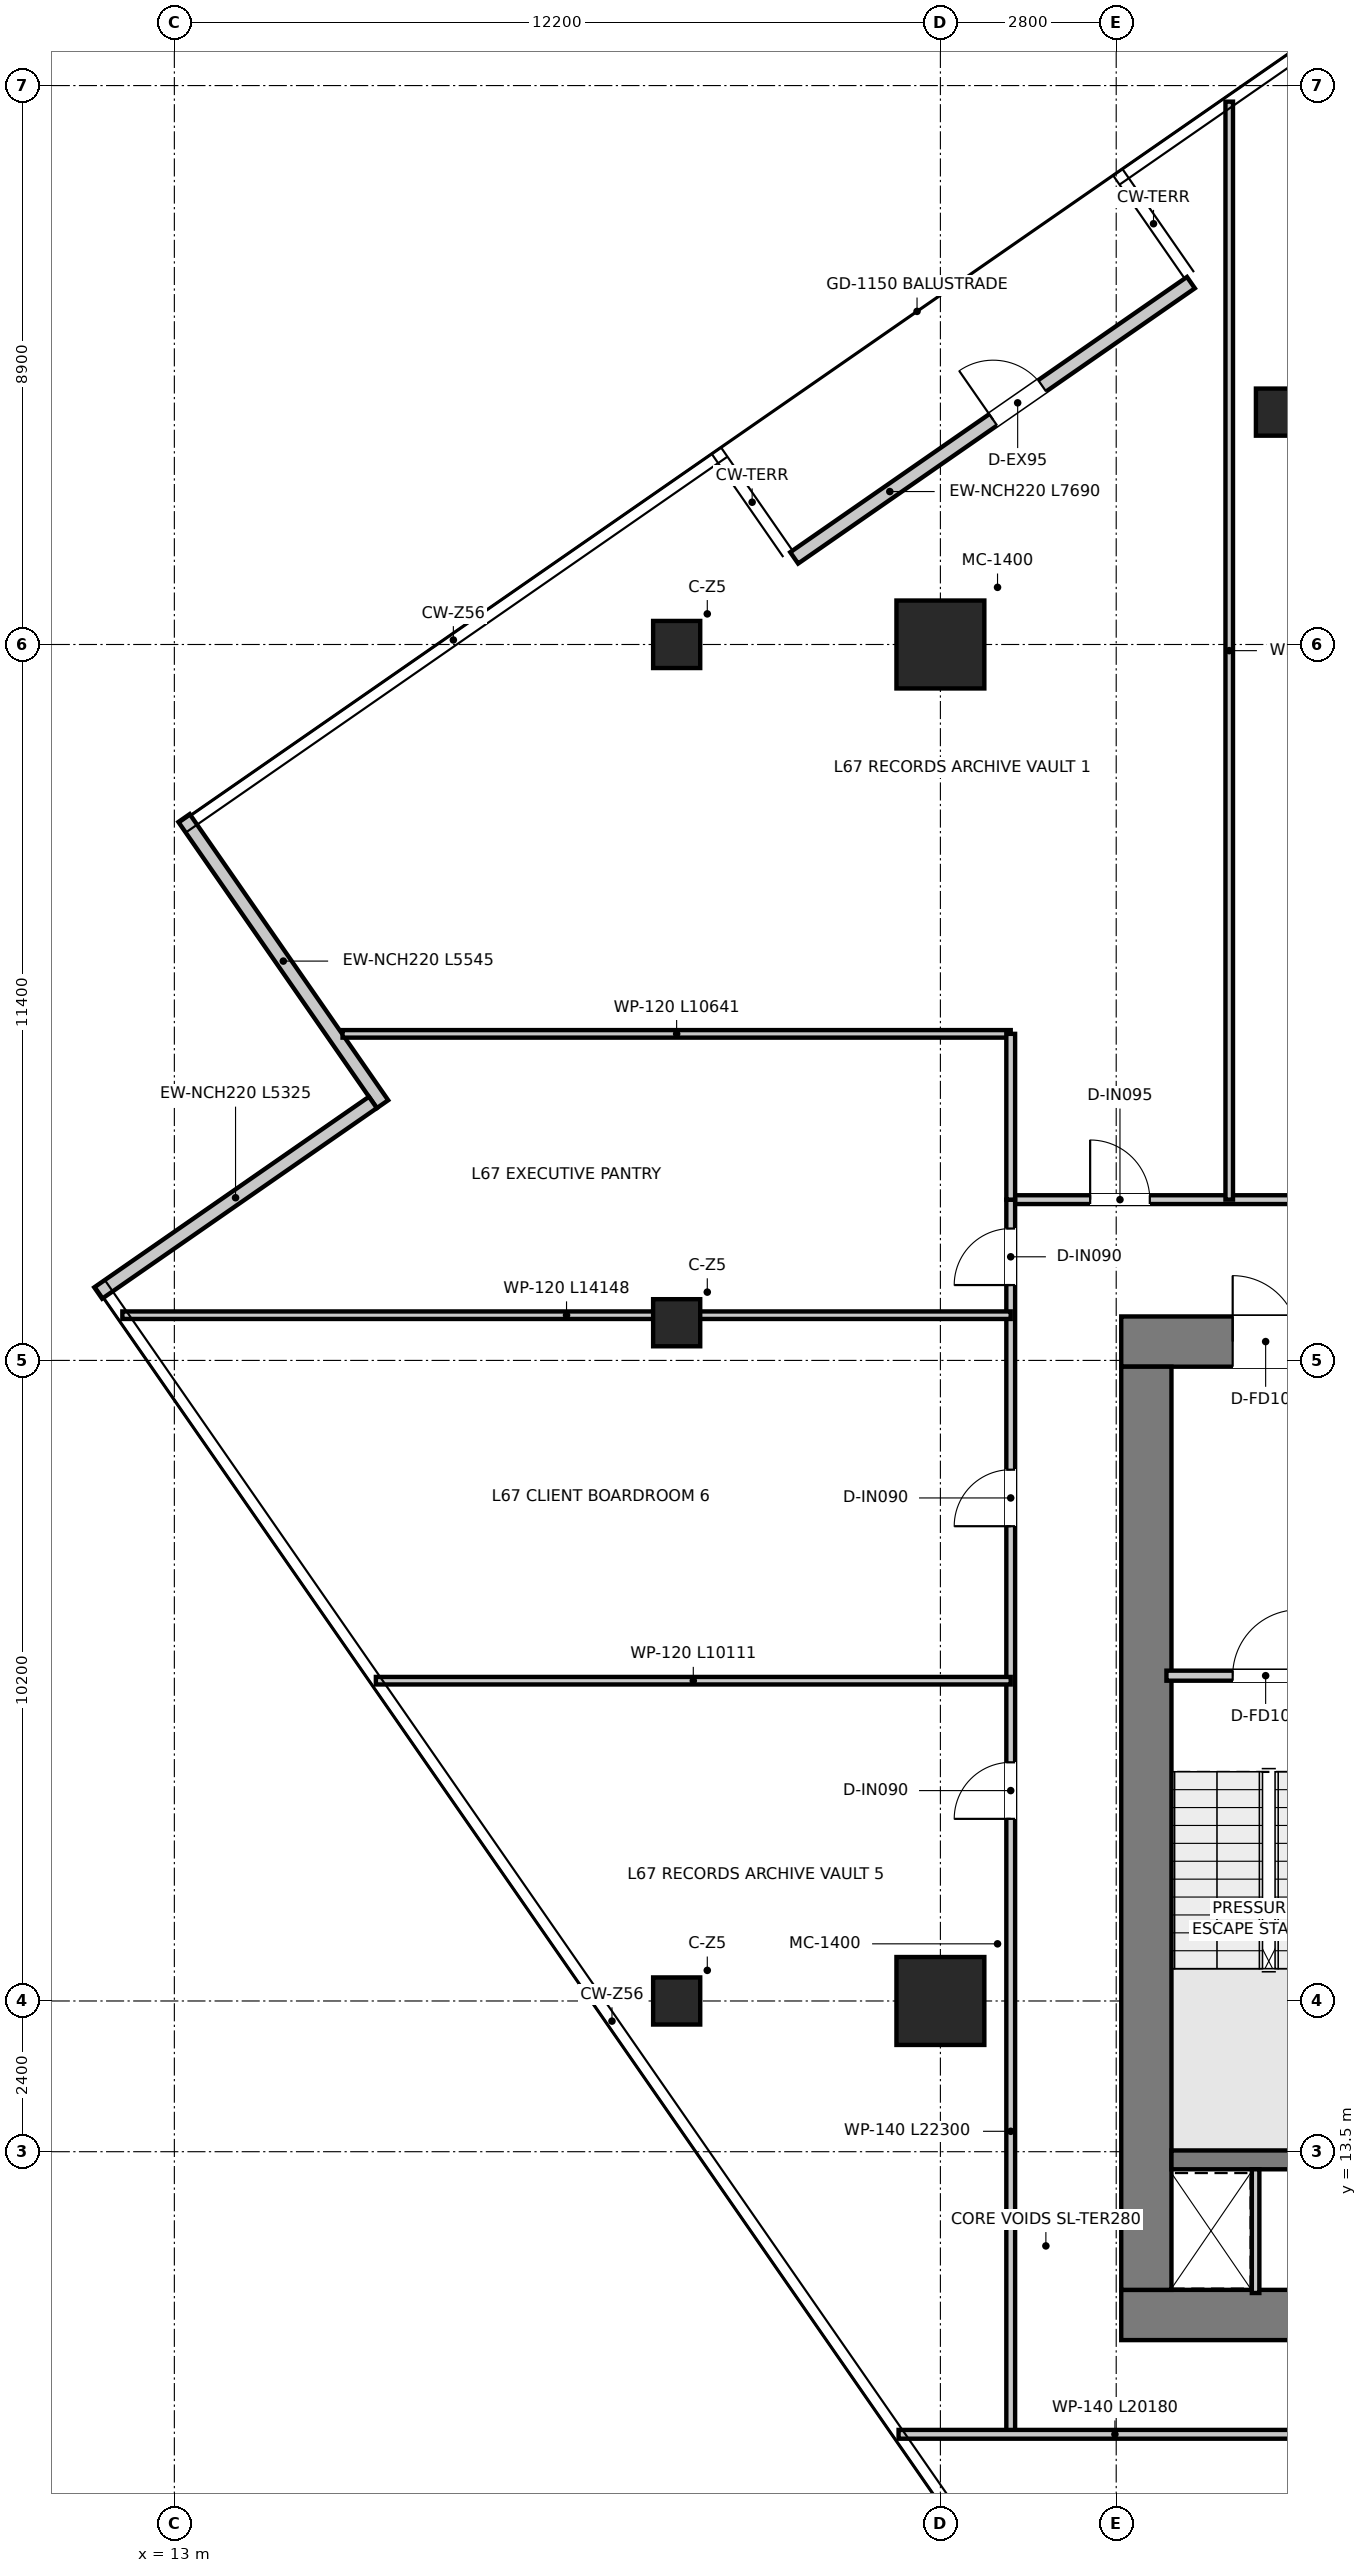
"""IFC4 building model, lengths in metres.
Left out: names, types, materials, properties, quantities, classifications, styles, units other than length and angle.
Written with IfcOpenShell. Run it as: python <this file> out.ifc"""

import sys

from ifc_helpers import new_model, si_unit, direction, frame, frame_2d, origin, origin_2d, place, context, subcontext, project, spatial, rectangle, extrude, source, transform, mapped, element, fill, save


model = new_model("IFC4")
c1 = context("Model", 3, precision=1e-05, world=origin(), true_north=direction((0.0, 1.0)))
c2 = subcontext(c1, "Body", "Model", "MODEL_VIEW")
j1 = project(units=[si_unit("LENGTHUNIT", "METRE"), si_unit("PLANEANGLEUNIT", "RADIAN")], contexts=[c1])
p1 = place(None, origin())
s1 = spatial("IfcSite", under=j1, at=p1, CompositionType="ELEMENT")
p2 = place(p1, origin())
s2 = spatial("IfcBuilding", under=s1, at=p2, CompositionType="ELEMENT")
p3 = place(p2, frame((0.0, 0.0, 275.3)))
s3 = spatial("IfcBuildingStorey", under=s2, at=p3, CompositionType="ELEMENT", Elevation=275.3)
p4 = place(p3, frame((28.08, 10.9, 0.0), z_axis=(0.0, 0.0, 1.0), x_axis=(1.0, 0.0, 0.0)))
e1 = element("IfcWall", 1, at=p4, inside=s3, PredefinedType="SHEAR", context=c2, shape_type="SweptSolid", body=[
    extrude(rectangle(XDim=15.84, YDim=0.8, at=frame_2d((7.92, 0.0))), origin(), (0.0, 0.0, 1.0), 3.95),
])
p5 = place(p3, frame((28.08, 26.4, 0.0), z_axis=(0.0, 0.0, 1.0), x_axis=(1.0, 0.0, 0.0)))
e2 = element("IfcWall", 2, at=p5, inside=s3, PredefinedType="SHEAR", context=c2, shape_type="SweptSolid", body=[
    extrude(rectangle(XDim=15.84, YDim=0.8, at=frame_2d((7.92, 0.0))), origin(), (0.0, 0.0, 1.0), 3.95),
])
p6 = place(p5, frame((7.22, 0.0, 0.0)))
e3 = element("IfcOpeningElement", 3, at=p6, cuts=e2, PredefinedType="OPENING", context=c2, shape_type="SweptSolid", body=[
    extrude(rectangle(XDim=1.4, YDim=2.2, at=frame_2d((0.7, 1.1))), frame((0.0, 0.41, 0.0), z_axis=(0.0, -1.0, 0.0), x_axis=(1.0, 0.0, 0.0)), (0.0, 0.0, 1.0), 0.82),
])
p7 = place(p5, frame((1.775, 0.0, 0.0)))
e4 = element("IfcOpeningElement", 4, at=p7, cuts=e2, PredefinedType="OPENING", context=c2, shape_type="SweptSolid", body=[
    extrude(rectangle(XDim=1.05, YDim=2.1, at=frame_2d((0.525, 1.05))), frame((0.0, 0.41, 0.0), z_axis=(0.0, -1.0, 0.0), x_axis=(1.0, 0.0, 0.0)), (0.0, 0.0, 1.0), 0.82),
])
p8 = place(p5, frame((13.015, 0.0, 0.0)))
e5 = element("IfcOpeningElement", 5, at=p8, cuts=e2, PredefinedType="OPENING", context=c2, shape_type="SweptSolid", body=[
    extrude(rectangle(XDim=1.05, YDim=2.1, at=frame_2d((0.525, 1.05))), frame((0.0, 0.41, 0.0), z_axis=(0.0, -1.0, 0.0), x_axis=(1.0, 0.0, 0.0)), (0.0, 0.0, 1.0), 0.82),
])
p9 = place(p3, frame((28.48, 11.3, 0.0), z_axis=(0.0, 0.0, 1.0), x_axis=(0.0, 1.0, 0.0)))
e6 = element("IfcWall", 6, at=p9, inside=s3, PredefinedType="SHEAR", context=c2, shape_type="SweptSolid", body=[
    extrude(rectangle(XDim=14.7, YDim=0.8, at=frame_2d((7.35, 0.0))), origin(), (0.0, 0.0, 1.0), 3.95),
])
p10 = place(p3, frame((28.88, 13.37, 0.0), z_axis=(0.0, 0.0, 1.0), x_axis=(1.0, 0.0, 0.0)))
e7 = element("IfcWall", 7, at=p10, inside=s3, PredefinedType="SHEAR", context=c2, shape_type="SweptSolid", body=[
    extrude(rectangle(XDim=3.1, YDim=0.3, at=frame_2d((1.55, 0.0))), origin(), (0.0, 0.0, 1.0), 3.95),
])
m1 = source(origin(), c2, "Body", "SweptSolid", [
    extrude(rectangle(XDim=1.4, YDim=1.4, at=origin_2d()), origin(), (0.0, 0.0, 1.0), 3.95),
])
for number, where, z_axis, x_axis in (
    (8, (25.2, 15.9, 0.0), (0.0, 0.0, 1.0), (1.0, 0.0, 0.0)),
    (9, (25.2, 37.5, 0.0), (0.0, 0.0, 1.0), (1.0, 0.0, 0.0)),
):
    element("IfcColumn", number, at=place(p3, frame(where, z_axis=z_axis, x_axis=x_axis)), inside=s3, PredefinedType="USERDEFINED", context=c2, shape_type="MappedRepresentation", body=[
        mapped(m1, transform((0.0, 0.0, 0.0), x_axis=(1.0, 0.0, 0.0), y_axis=(0.0, 1.0, 0.0), z_axis=(0.0, 0.0, 1.0), scale=1.0)),
    ])
m2 = source(origin(), c2, "Body", "SweptSolid", [
    extrude(rectangle(XDim=0.75, YDim=0.75, at=origin_2d()), origin(), (0.0, 0.0, 1.0), 3.95),
])
for number, where, z_axis, x_axis in (
    (10, (21.0, 15.9, 0.0), (0.0, 0.0, 1.0), (1.0, 0.0, 0.0)),
    (11, (21.0, 26.7, 0.0), (0.0, 0.0, 1.0), (1.0, 0.0, 0.0)),
    (12, (21.0, 37.5, 0.0), (0.0, 0.0, 1.0), (1.0, 0.0, 0.0)),
    (13, (30.6, 41.2, 0.0), (0.0, 0.0, 1.0), (1.0, 0.0, 0.0)),
):
    element("IfcColumn", number, at=place(p3, frame(where, z_axis=z_axis, x_axis=x_axis)), inside=s3, PredefinedType="COLUMN", context=c2, shape_type="MappedRepresentation", body=[
        mapped(m2, transform((0.0, 0.0, 0.0), x_axis=(1.0, 0.0, 0.0), y_axis=(0.0, 1.0, 0.0), z_axis=(0.0, 0.0, 1.0), scale=1.0)),
    ])
p11 = place(p3, frame((22.872, 38.879, 0.0), z_axis=(0.0, 0.0, 1.0), x_axis=(0.821640913491, 0.570005446709, 0.0)))
e14 = element("IfcWall", 14, at=p11, inside=s3, PredefinedType="ELEMENTEDWALL", context=c2, shape_type="SweptSolid", body=[
    extrude(rectangle(XDim=7.69, YDim=0.22, at=frame_2d((3.845, 0.0))), origin(), (0.0, 0.0, 1.0), 3.67),
])
p12 = place(p11, frame((3.857, 0.0, 0.0)))
e15 = element("IfcOpeningElement", 15, at=p12, cuts=e14, PredefinedType="OPENING", context=c2, shape_type="SweptSolid", body=[
    extrude(rectangle(XDim=0.95, YDim=2.1, at=frame_2d((0.475, 1.05))), frame((0.0, 0.12, 0.0), z_axis=(0.0, -1.0, 0.0), x_axis=(1.0, 0.0, 0.0)), (0.0, 0.0, 1.0), 0.24),
])
p13 = place(p3, frame((13.155, 34.737, 0.0), z_axis=(0.0, 0.0, 1.0), x_axis=(0.569988141022, -0.821652918874, 0.0)))
e16 = element("IfcWall", 16, at=p13, inside=s3, PredefinedType="ELEMENTEDWALL", context=c2, shape_type="SweptSolid", body=[
    extrude(rectangle(XDim=5.545, YDim=0.22, at=frame_2d((2.772, 0.0))), origin(), (0.0, 0.0, 1.0), 3.67),
])
p14 = place(p3, frame((16.162, 30.208, 0.0), z_axis=(0.0, 0.0, 1.0), x_axis=(-0.821652092748, -0.569989331903, 0.0)))
e17 = element("IfcWall", 17, at=p14, inside=s3, PredefinedType="ELEMENTEDWALL", context=c2, shape_type="SweptSolid", body=[
    extrude(rectangle(XDim=5.325, YDim=0.22, at=frame_2d((2.663, 0.0))), origin(), (0.0, 0.0, 1.0), 3.67),
])
p15 = place(p3, frame((28.8, 21.08, 0.0), z_axis=(0.0, 0.0, 1.0), x_axis=(1.0, 0.0, 0.0)))
e18 = element("IfcWall", 18, at=p15, inside=s3, PredefinedType="PARTITIONING", context=c2, shape_type="SweptSolid", body=[
    extrude(rectangle(XDim=3.16, YDim=0.16, at=frame_2d((1.58, 0.0))), origin(), (0.0, 0.0, 1.0), 3.67),
])
p16 = place(p15, frame((1.055, 0.0, 0.0)))
e19 = element("IfcOpeningElement", 19, at=p16, cuts=e18, PredefinedType="OPENING", context=c2, shape_type="SweptSolid", body=[
    extrude(rectangle(XDim=1.05, YDim=2.1, at=frame_2d((0.525, 1.05))), frame((0.0, 0.09, 0.0), z_axis=(0.0, -1.0, 0.0), x_axis=(1.0, 0.0, 0.0)), (0.0, 0.0, 1.0), 0.18),
])
p17 = place(p3, frame((30.22, 11.25, 0.0), z_axis=(0.0, 0.0, 1.0), x_axis=(0.0, 1.0, 0.0)))
e20 = element("IfcWall", 20, at=p17, inside=s3, PredefinedType="PARTITIONING", context=c2, shape_type="SweptSolid", body=[
    extrude(rectangle(XDim=1.97, YDim=0.12, at=frame_2d((0.985, 0.0))), origin(), (0.0, 0.0, 1.0), 3.67),
])
p18 = place(p3, frame((26.32, 28.66, 0.0), z_axis=(0.0, 0.0, 1.0), x_axis=(1.0, 0.0, 0.0)))
e21 = element("IfcWall", 21, at=p18, inside=s3, PredefinedType="PARTITIONING", context=c2, shape_type="SweptSolid", body=[
    extrude(rectangle(XDim=19.36, YDim=0.14, at=frame_2d((9.68, 0.0))), origin(), (0.0, 0.0, 1.0), 3.18),
])
p19 = place(p18, frame((1.265, 0.0, 0.0)))
e22 = element("IfcOpeningElement", 22, at=p19, cuts=e21, PredefinedType="OPENING", context=c2, shape_type="SweptSolid", body=[
    extrude(rectangle(XDim=0.95, YDim=2.1, at=frame_2d((0.475, 1.05))), frame((0.0, 0.08, 0.0), z_axis=(0.0, -1.0, 0.0), x_axis=(1.0, 0.0, 0.0)), (0.0, 0.0, 1.0), 0.16),
])
p20 = place(p18, frame((6.105, 0.0, 0.0)))
e23 = element("IfcOpeningElement", 23, at=p20, cuts=e21, PredefinedType="OPENING", context=c2, shape_type="SweptSolid", body=[
    extrude(rectangle(XDim=0.95, YDim=2.1, at=frame_2d((0.475, 1.05))), frame((0.0, 0.08, 0.0), z_axis=(0.0, -1.0, 0.0), x_axis=(1.0, 0.0, 0.0)), (0.0, 0.0, 1.0), 0.16),
])
p21 = place(p18, frame((12.305, 0.0, 0.0)))
e24 = element("IfcOpeningElement", 24, at=p21, cuts=e21, PredefinedType="OPENING", context=c2, shape_type="SweptSolid", body=[
    extrude(rectangle(XDim=0.95, YDim=2.1, at=frame_2d((0.475, 1.05))), frame((0.0, 0.08, 0.0), z_axis=(0.0, -1.0, 0.0), x_axis=(1.0, 0.0, 0.0)), (0.0, 0.0, 1.0), 0.16),
])
p22 = place(p18, frame((17.145, 0.0, 0.0)))
e25 = element("IfcOpeningElement", 25, at=p22, cuts=e21, PredefinedType="OPENING", context=c2, shape_type="SweptSolid", body=[
    extrude(rectangle(XDim=0.95, YDim=2.1, at=frame_2d((0.475, 1.05))), frame((0.0, 0.08, 0.0), z_axis=(0.0, -1.0, 0.0), x_axis=(1.0, 0.0, 0.0)), (0.0, 0.0, 1.0), 0.16),
])
p23 = place(p3, frame((26.32, 9.0, 0.0), z_axis=(0.0, 0.0, 1.0), x_axis=(0.0, 1.0, 0.0)))
e26 = element("IfcWall", 26, at=p23, inside=s3, PredefinedType="PARTITIONING", context=c2, shape_type="SweptSolid", body=[
    extrude(rectangle(XDim=19.66, YDim=0.14, at=frame_2d((9.83, 0.0))), origin(), (0.0, 0.0, 1.0), 3.13),
])
p24 = place(p23, frame((18.3, 0.0, 0.0)))
e27 = element("IfcOpeningElement", 27, at=p24, cuts=e26, PredefinedType="OPENING", context=c2, shape_type="SweptSolid", body=[
    extrude(rectangle(XDim=0.9, YDim=2.1, at=frame_2d((0.45, 1.05))), frame((0.0, 0.08, 0.0), z_axis=(0.0, -1.0, 0.0), x_axis=(1.0, 0.0, 0.0)), (0.0, 0.0, 1.0), 0.16),
])
p25 = place(p23, frame((9.8, 0.0, 0.0)))
e28 = element("IfcOpeningElement", 28, at=p25, cuts=e26, PredefinedType="OPENING", context=c2, shape_type="SweptSolid", body=[
    extrude(rectangle(XDim=0.9, YDim=2.1, at=frame_2d((0.45, 1.05))), frame((0.0, 0.08, 0.0), z_axis=(0.0, -1.0, 0.0), x_axis=(1.0, 0.0, 0.0)), (0.0, 0.0, 1.0), 0.16),
])
p26 = place(p23, frame((14.46, 0.0, 0.0)))
e29 = element("IfcOpeningElement", 29, at=p26, cuts=e26, PredefinedType="OPENING", context=c2, shape_type="SweptSolid", body=[
    extrude(rectangle(XDim=0.9, YDim=2.1, at=frame_2d((0.45, 1.05))), frame((0.0, 0.08, 0.0), z_axis=(0.0, -1.0, 0.0), x_axis=(1.0, 0.0, 0.0)), (0.0, 0.0, 1.0), 0.16),
])
p27 = place(p3, frame((24.534, 9.0, 0.0), z_axis=(0.0, 0.0, 1.0), x_axis=(1.0, 0.0, 0.0)))
e30 = element("IfcWall", 30, at=p27, inside=s3, PredefinedType="PARTITIONING", context=c2, shape_type="SweptSolid", body=[
    extrude(rectangle(XDim=20.18, YDim=0.14, at=frame_2d((10.09, 0.0))), origin(), (0.0, 0.0, 1.0), 3.67),
])
p28 = place(p27, frame((7.041, 0.0, 0.0)))
e31 = element("IfcOpeningElement", 31, at=p28, cuts=e30, PredefinedType="OPENING", context=c2, shape_type="SweptSolid", body=[
    extrude(rectangle(XDim=0.85, YDim=2.1, at=frame_2d((0.425, 1.05))), frame((0.0, 0.08, 0.0), z_axis=(0.0, -1.0, 0.0), x_axis=(1.0, 0.0, 0.0)), (0.0, 0.0, 1.0), 0.16),
])
p29 = place(p27, frame((15.041, 0.0, 0.0)))
e32 = element("IfcOpeningElement", 32, at=p29, cuts=e30, PredefinedType="OPENING", context=c2, shape_type="SweptSolid", body=[
    extrude(rectangle(XDim=0.85, YDim=2.1, at=frame_2d((0.425, 1.05))), frame((0.0, 0.08, 0.0), z_axis=(0.0, -1.0, 0.0), x_axis=(1.0, 0.0, 0.0)), (0.0, 0.0, 1.0), 0.16),
])
p30 = place(p3, frame((12.172, 26.82, 0.0), z_axis=(0.0, 0.0, 1.0), x_axis=(1.0, 0.0, 0.0)))
e33 = element("IfcWall", 33, at=p30, inside=s3, PredefinedType="PARTITIONING", context=c2, shape_type="SweptSolid", body=[
    extrude(rectangle(XDim=14.148, YDim=0.12, at=frame_2d((7.074, 0.0))), origin(), (0.0, 0.0, 1.0), 3.13),
])
p31 = place(p3, frame((15.679, 31.3, 0.0), z_axis=(0.0, 0.0, 1.0), x_axis=(1.0, 0.0, 0.0)))
e34 = element("IfcWall", 34, at=p31, inside=s3, PredefinedType="PARTITIONING", context=c2, shape_type="SweptSolid", body=[
    extrude(rectangle(XDim=10.641, YDim=0.12, at=frame_2d((5.321, 0.0))), origin(), (0.0, 0.0, 1.0), 3.13),
])
p32 = place(p3, frame((26.32, 28.66, 0.0), z_axis=(0.0, 0.0, 1.0), x_axis=(0.0, 1.0, 0.0)))
e35 = element("IfcWall", 35, at=p32, inside=s3, PredefinedType="PARTITIONING", context=c2, shape_type="SweptSolid", body=[
    extrude(rectangle(XDim=2.64, YDim=0.14, at=frame_2d((1.32, 0.0))), origin(), (0.0, 0.0, 1.0), 3.43),
])
p33 = place(p3, frame((29.8, 28.66, 0.0), z_axis=(0.0, 0.0, 1.0), x_axis=(0.0, 1.0, 0.0)))
e36 = element("IfcWall", 36, at=p33, inside=s3, PredefinedType="PARTITIONING", context=c2, shape_type="SweptSolid", body=[
    extrude(rectangle(XDim=17.484, YDim=0.12, at=frame_2d((8.742, 0.0))), origin(), (0.0, 0.0, 1.0), 3.13),
])
p34 = place(p3, frame((16.209, 21.0, 0.0), z_axis=(0.0, 0.0, 1.0), x_axis=(1.0, 0.0, 0.0)))
e37 = element("IfcWall", 37, at=p34, inside=s3, PredefinedType="PARTITIONING", context=c2, shape_type="SweptSolid", body=[
    extrude(rectangle(XDim=10.111, YDim=0.12, at=frame_2d((5.055, 0.0))), origin(), (0.0, 0.0, 1.0), 3.13),
])
p35 = place(p16, origin())
e38 = element("IfcDoor", 38, at=p35, inside=s3, OperationType="SINGLE_SWING_RIGHT", PredefinedType="DOOR", context=c2, shape_type="SweptSolid", body=[
    extrude(rectangle(XDim=1.05, YDim=2.1, at=frame_2d((0.525, 1.05))), frame((0.0, 0.025, 0.0), z_axis=(0.0, -1.0, 0.0), x_axis=(1.0, 0.0, 0.0)), (0.0, 0.0, 1.0), 0.05),
])
fill(e19, e38)
p36 = place(p7, origin())
e39 = element("IfcDoor", 39, at=p36, inside=s3, OperationType="SINGLE_SWING_LEFT", PredefinedType="DOOR", context=c2, shape_type="SweptSolid", body=[
    extrude(rectangle(XDim=1.05, YDim=2.1, at=frame_2d((0.525, 1.05))), frame((0.0, 0.025, 0.0), z_axis=(0.0, -1.0, 0.0), x_axis=(1.0, 0.0, 0.0)), (0.0, 0.0, 1.0), 0.05),
])
fill(e4, e39)
p37 = place(p24, origin())
e40 = element("IfcDoor", 40, at=p37, inside=s3, OperationType="SINGLE_SWING_LEFT", PredefinedType="DOOR", context=c2, shape_type="SweptSolid", body=[
    extrude(rectangle(XDim=0.9, YDim=2.1, at=frame_2d((0.45, 1.05))), frame((0.0, 0.025, 0.0), z_axis=(0.0, -1.0, 0.0), x_axis=(1.0, 0.0, 0.0)), (0.0, 0.0, 1.0), 0.05),
])
fill(e27, e40)
p38 = place(p19, origin())
e41 = element("IfcDoor", 41, at=p38, inside=s3, OperationType="SINGLE_SWING_LEFT", PredefinedType="DOOR", context=c2, shape_type="SweptSolid", body=[
    extrude(rectangle(XDim=0.95, YDim=2.1, at=frame_2d((0.475, 1.05))), frame((0.0, 0.025, 0.0), z_axis=(0.0, -1.0, 0.0), x_axis=(1.0, 0.0, 0.0)), (0.0, 0.0, 1.0), 0.05),
])
fill(e22, e41)
p39 = place(p25, origin())
e42 = element("IfcDoor", 42, at=p39, inside=s3, OperationType="SINGLE_SWING_LEFT", PredefinedType="DOOR", context=c2, shape_type="SweptSolid", body=[
    extrude(rectangle(XDim=0.9, YDim=2.1, at=frame_2d((0.45, 1.05))), frame((0.0, 0.025, 0.0), z_axis=(0.0, -1.0, 0.0), x_axis=(1.0, 0.0, 0.0)), (0.0, 0.0, 1.0), 0.05),
])
fill(e28, e42)
p40 = place(p26, origin())
e43 = element("IfcDoor", 43, at=p40, inside=s3, OperationType="SINGLE_SWING_LEFT", PredefinedType="DOOR", context=c2, shape_type="SweptSolid", body=[
    extrude(rectangle(XDim=0.9, YDim=2.1, at=frame_2d((0.45, 1.05))), frame((0.0, 0.025, 0.0), z_axis=(0.0, -1.0, 0.0), x_axis=(1.0, 0.0, 0.0)), (0.0, 0.0, 1.0), 0.05),
])
fill(e29, e43)
p41 = place(p12, origin())
e44 = element("IfcDoor", 44, at=p41, inside=s3, OperationType="SINGLE_SWING_LEFT", PredefinedType="DOOR", context=c2, shape_type="SweptSolid", body=[
    extrude(rectangle(XDim=0.95, YDim=2.1, at=frame_2d((0.475, 1.05))), frame((0.0, 0.025, 0.0), z_axis=(0.0, -1.0, 0.0), x_axis=(1.0, 0.0, 0.0)), (0.0, 0.0, 1.0), 0.05),
])
fill(e15, e44)
save(model, sys.argv[1])
